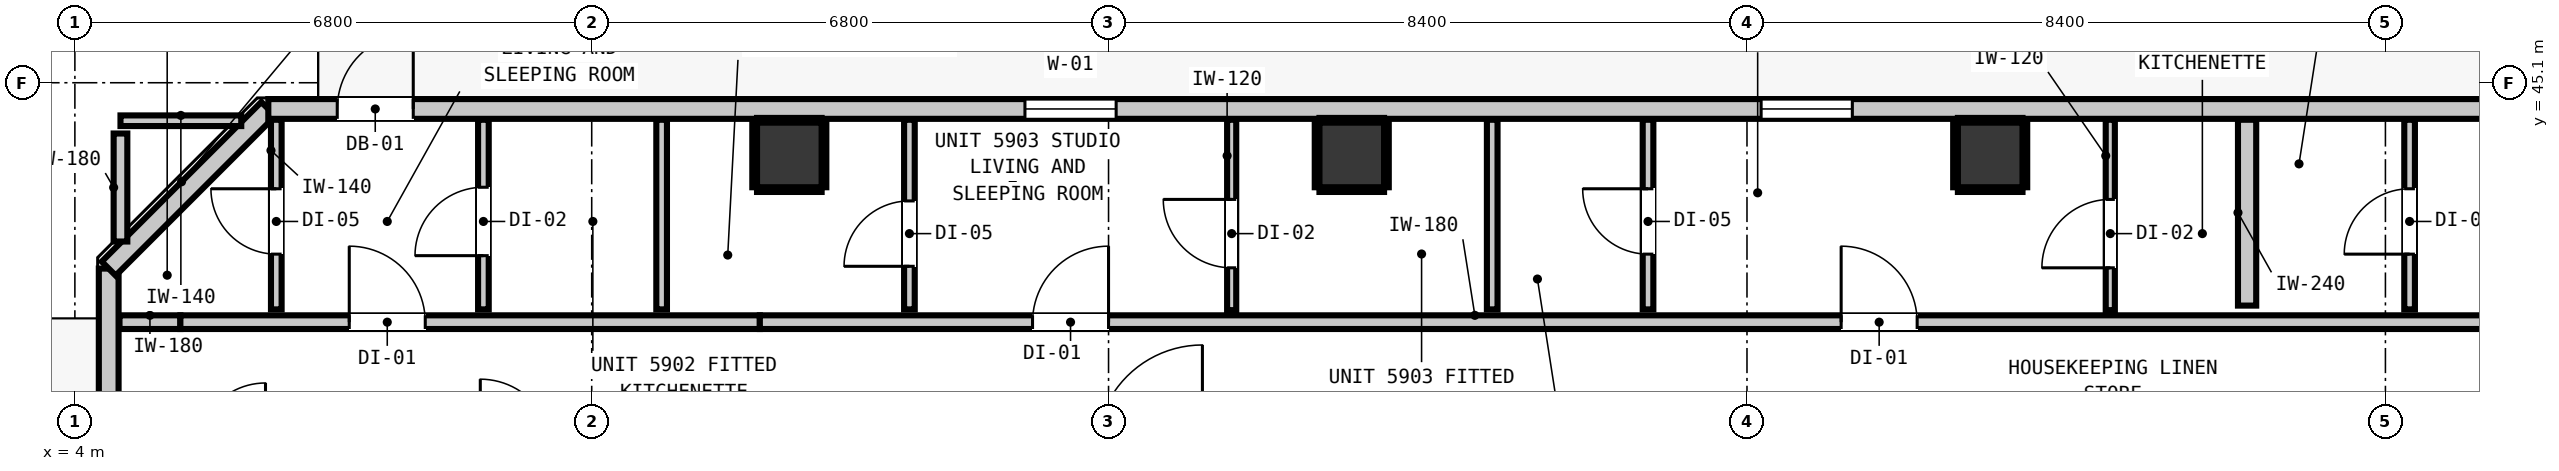
"""IFC4 building model, lengths in metres.
Left out: names, types, materials, properties, quantities, classifications, styles, units other than length and angle.
Written with IfcOpenShell. Run it as: python <this file> out.ifc"""

import sys

from ifc_helpers import new_model, si_unit, direction, frame, frame_2d, origin, origin_2d, place, context, subcontext, project, spatial, rectangle, extrude, element, fill, save


model = new_model("IFC4")
c1 = context("Model", 3, precision=1e-05, world=origin(), true_north=direction((0.0, 1.0)))
c2 = subcontext(c1, "Body", "Model", "MODEL_VIEW")
j1 = project(units=[si_unit("LENGTHUNIT", "METRE"), si_unit("PLANEANGLEUNIT", "RADIAN")], contexts=[c1])
p1 = place(None, origin())
s1 = spatial("IfcSite", under=j1, at=p1, CompositionType="ELEMENT")
p2 = place(p1, origin())
s2 = spatial("IfcBuilding", under=s1, at=p2, CompositionType="ELEMENT")
p3 = place(p2, frame((0.0, 0.0, 203.44)))
s3 = spatial("IfcBuildingStorey", under=s2, at=p3, CompositionType="ELEMENT", Elevation=203.44)
for number, where, z_axis, x_axis in (
    (1, (13.4, 44.15, 0.0), (0.0, 0.0, 1.0), (1.0, 0.0, 0.0)),
    (2, (20.8, 44.15, 0.0), (0.0, 0.0, 1.0), (1.0, 0.0, 0.0)),
    (3, (29.2, 44.15, 0.0), (0.0, 0.0, 1.0), (1.0, 0.0, 0.0)),
):
    element("IfcColumn", number, at=place(p3, frame(where, z_axis=z_axis, x_axis=x_axis)), inside=s3, PredefinedType="COLUMN", context=c2, shape_type="SweptSolid", body=[
        extrude(rectangle(XDim=0.85, YDim=0.85, at=origin_2d()), origin(), (0.0, 0.0, 1.0), 3.32),
    ])
p4 = place(p3, frame((4.445, 12.345, 0.0), z_axis=(0.0, 0.0, 1.0), x_axis=(0.0, 1.0, 0.0)))
e4 = element("IfcWall", 4, at=p4, inside=s3, PredefinedType="STANDARD", context=c2, shape_type="SweptSolid", body=[
    extrude(rectangle(XDim=30.31, YDim=0.26, at=frame_2d((15.155, 0.0))), origin(), (0.0, 0.0, 1.0), 3.1),
])
p5 = place(p4, frame((0.91, 0.0, 0.0)))
e5 = element("IfcOpeningElement", 5, at=p5, cuts=e4, PredefinedType="OPENING", context=c2, shape_type="SweptSolid", body=[
    extrude(rectangle(XDim=1.0, YDim=2.15, at=frame_2d((0.5, 1.075))), frame((0.0, 0.14, 0.0), z_axis=(0.0, -1.0, 0.0), x_axis=(1.0, 0.0, 0.0)), (0.0, 0.0, 1.0), 0.28),
])
p6 = place(p4, frame((2.322, 0.0, 0.85)))
e6 = element("IfcOpeningElement", 6, at=p6, cuts=e4, PredefinedType="OPENING", context=c2, shape_type="SweptSolid", body=[
    extrude(rectangle(XDim=0.58, YDim=1.5, at=frame_2d((0.29, 0.75))), frame((0.0, 0.14, 0.0), z_axis=(0.0, -1.0, 0.0), x_axis=(1.0, 0.0, 0.0)), (0.0, 0.0, 1.0), 0.28),
])
p7 = place(p4, frame((13.405, 0.0, 0.85)))
e7 = element("IfcOpeningElement", 7, at=p7, cuts=e4, PredefinedType="OPENING", context=c2, shape_type="SweptSolid", body=[
    extrude(rectangle(XDim=1.2, YDim=1.8, at=frame_2d((0.6, 0.9))), frame((0.0, 0.14, 0.0), z_axis=(0.0, -1.0, 0.0), x_axis=(1.0, 0.0, 0.0)), (0.0, 0.0, 1.0), 0.28),
])
p8 = place(p3, frame((4.445, 42.655, 0.0), z_axis=(0.0, 0.0, 1.0), x_axis=(0.707106781187, 0.707106781187, 0.0)))
e8 = element("IfcWall", 8, at=p8, inside=s3, PredefinedType="STANDARD", context=c2, shape_type="SweptSolid", body=[
    extrude(rectangle(XDim=2.97, YDim=0.26, at=frame_2d((1.485, 0.0))), origin(), (0.0, 0.0, 1.0), 3.1),
])
p9 = place(p3, frame((6.545, 44.755, 0.0), z_axis=(0.0, 0.0, 1.0), x_axis=(1.0, 0.0, 0.0)))
e9 = element("IfcWall", 9, at=p9, inside=s3, PredefinedType="STANDARD", context=c2, shape_type="SweptSolid", body=[
    extrude(rectangle(XDim=32.71, YDim=0.26, at=frame_2d((16.355, 0.0))), origin(), (0.0, 0.0, 1.0), 3.1),
])
p10 = place(p9, frame((0.907, 0.0, 0.0)))
e10 = element("IfcOpeningElement", 10, at=p10, cuts=e9, PredefinedType="OPENING", context=c2, shape_type="SweptSolid", body=[
    extrude(rectangle(XDim=1.0, YDim=2.15, at=frame_2d((0.5, 1.075))), frame((0.0, 0.14, 0.0), z_axis=(0.0, -1.0, 0.0), x_axis=(1.0, 0.0, 0.0)), (0.0, 0.0, 1.0), 0.28),
])
p11 = place(p9, frame((9.955, 0.0, 0.85)))
e11 = element("IfcOpeningElement", 11, at=p11, cuts=e9, PredefinedType="OPENING", context=c2, shape_type="SweptSolid", body=[
    extrude(rectangle(XDim=1.2, YDim=1.8, at=frame_2d((0.6, 0.9))), frame((0.0, 0.14, 0.0), z_axis=(0.0, -1.0, 0.0), x_axis=(1.0, 0.0, 0.0)), (0.0, 0.0, 1.0), 0.28),
])
p12 = place(p9, frame((19.641, 0.0, 0.85)))
e12 = element("IfcOpeningElement", 12, at=p12, cuts=e9, PredefinedType="OPENING", context=c2, shape_type="SweptSolid", body=[
    extrude(rectangle(XDim=1.2, YDim=1.8, at=frame_2d((0.6, 0.9))), frame((0.0, 0.14, 0.0), z_axis=(0.0, -1.0, 0.0), x_axis=(1.0, 0.0, 0.0)), (0.0, 0.0, 1.0), 0.28),
])
p13 = place(p9, frame((30.792, 0.0, 0.85)))
e13 = element("IfcOpeningElement", 13, at=p13, cuts=e9, PredefinedType="OPENING", context=c2, shape_type="SweptSolid", body=[
    extrude(rectangle(XDim=1.2, YDim=1.8, at=frame_2d((0.6, 0.9))), frame((0.0, 0.14, 0.0), z_axis=(0.0, -1.0, 0.0), x_axis=(1.0, 0.0, 0.0)), (0.0, 0.0, 1.0), 0.28),
])
p14 = place(p3, frame((4.587, 41.95, 0.0), z_axis=(0.0, 0.0, 1.0), x_axis=(1.0, 0.0, 0.0)))
e14 = element("IfcWall", 14, at=p14, inside=s3, PredefinedType="PARTITIONING", context=c2, shape_type="SweptSolid", body=[
    extrude(rectangle(XDim=0.801, YDim=0.18, at=frame_2d((0.4, 0.0))), origin(), (0.0, 0.0, 1.0), 3.1),
])
p15 = place(p3, frame((5.388, 41.95, 0.0), z_axis=(0.0, 0.0, 1.0), x_axis=(1.0, 0.0, 0.0)))
e15 = element("IfcWall", 15, at=p15, inside=s3, PredefinedType="PARTITIONING", context=c2, shape_type="SweptSolid", body=[
    extrude(rectangle(XDim=7.624, YDim=0.18, at=frame_2d((3.812, 0.0))), origin(), (0.0, 0.0, 1.0), 2.477),
])
p16 = place(p15, frame((2.222, 0.0, 0.0)))
e16 = element("IfcOpeningElement", 16, at=p16, cuts=e15, PredefinedType="OPENING", context=c2, shape_type="SweptSolid", body=[
    extrude(rectangle(XDim=1.0, YDim=2.15, at=frame_2d((0.5, 1.075))), frame((0.0, 0.1, 0.0), z_axis=(0.0, -1.0, 0.0), x_axis=(1.0, 0.0, 0.0)), (0.0, 0.0, 1.0), 0.2),
])
p17 = place(p3, frame((13.012, 41.95, 0.0), z_axis=(0.0, 0.0, 1.0), x_axis=(1.0, 0.0, 0.0)))
e17 = element("IfcWall", 17, at=p17, inside=s3, PredefinedType="PARTITIONING", context=c2, shape_type="SweptSolid", body=[
    extrude(rectangle(XDim=28.201, YDim=0.18, at=frame_2d((14.101, 0.0))), origin(), (0.0, 0.0, 1.0), 3.1),
])
p18 = place(p17, frame((3.588, 0.0, 0.0)))
e18 = element("IfcOpeningElement", 18, at=p18, cuts=e17, PredefinedType="OPENING", context=c2, shape_type="SweptSolid", body=[
    extrude(rectangle(XDim=1.0, YDim=2.15, at=frame_2d((0.5, 1.075))), frame((0.0, 0.1, 0.0), z_axis=(0.0, -1.0, 0.0), x_axis=(1.0, 0.0, 0.0)), (0.0, 0.0, 1.0), 0.2),
])
p19 = place(p17, frame((14.227, 0.0, 0.0)))
e19 = element("IfcOpeningElement", 19, at=p19, cuts=e17, PredefinedType="OPENING", context=c2, shape_type="SweptSolid", body=[
    extrude(rectangle(XDim=1.0, YDim=2.15, at=frame_2d((0.5, 1.075))), frame((0.0, 0.1, 0.0), z_axis=(0.0, -1.0, 0.0), x_axis=(1.0, 0.0, 0.0)), (0.0, 0.0, 1.0), 0.2),
])
p20 = place(p17, frame((23.372, 0.0, 0.0)))
e20 = element("IfcOpeningElement", 20, at=p20, cuts=e17, PredefinedType="OPENING", context=c2, shape_type="SweptSolid", body=[
    extrude(rectangle(XDim=1.0, YDim=2.15, at=frame_2d((0.5, 1.075))), frame((0.0, 0.1, 0.0), z_axis=(0.0, -1.0, 0.0), x_axis=(1.0, 0.0, 0.0)), (0.0, 0.0, 1.0), 0.2),
])
p21 = place(p3, frame((4.6, 44.6, 0.0), z_axis=(0.0, 0.0, 1.0), x_axis=(1.0, 0.0, 0.0)))
e21 = element("IfcWall", 21, at=p21, inside=s3, PredefinedType="PARTITIONING", context=c2, shape_type="SweptSolid", body=[
    extrude(rectangle(XDim=1.589, YDim=0.14, at=frame_2d((0.794, 0.0))), origin(), (0.0, 0.0, 1.0), 3.1),
])
p22 = place(p3, frame((32.58, 42.168, 0.0), z_axis=(0.0, 0.0, 1.0), x_axis=(0.0, 1.0, 0.0)))
e22 = element("IfcWall", 22, at=p22, inside=s3, PredefinedType="PARTITIONING", context=c2, shape_type="SweptSolid", body=[
    extrude(rectangle(XDim=2.445, YDim=0.24, at=frame_2d((1.223, 0.0))), origin(), (0.0, 0.0, 1.0), 3.1),
])
p23 = place(p3, frame((4.6, 43.011, 0.0), z_axis=(0.0, 0.0, 1.0), x_axis=(0.0, 1.0, 0.0)))
e23 = element("IfcWall", 23, at=p23, inside=s3, PredefinedType="PARTITIONING", context=c2, shape_type="SweptSolid", body=[
    extrude(rectangle(XDim=1.421, YDim=0.18, at=frame_2d((0.71, 0.0))), origin(), (0.0, 0.0, 1.0), 3.1),
])
p24 = place(p3, frame((6.65, 42.118, 0.0), z_axis=(0.0, 0.0, 1.0), x_axis=(0.0, 1.0, 0.0)))
e24 = element("IfcWall", 24, at=p24, inside=s3, PredefinedType="PARTITIONING", context=c2, shape_type="SweptSolid", body=[
    extrude(rectangle(XDim=2.495, YDim=0.14, at=frame_2d((1.248, 0.0))), origin(), (0.0, 0.0, 1.0), 3.1),
])
p25 = place(p24, frame((0.727, 0.0, 0.0)))
e25 = element("IfcOpeningElement", 25, at=p25, cuts=e24, PredefinedType="OPENING", context=c2, shape_type="SweptSolid", body=[
    extrude(rectangle(XDim=0.86, YDim=2.02, at=frame_2d((0.43, 1.01))), frame((0.0, 0.08, 0.0), z_axis=(0.0, -1.0, 0.0), x_axis=(1.0, 0.0, 0.0)), (0.0, 0.0, 1.0), 0.16),
])
p26 = place(p3, frame((9.375, 42.118, 0.0), z_axis=(0.0, 0.0, 1.0), x_axis=(0.0, 1.0, 0.0)))
e26 = element("IfcWall", 26, at=p26, inside=s3, PredefinedType="PARTITIONING", context=c2, shape_type="SweptSolid", body=[
    extrude(rectangle(XDim=2.495, YDim=0.14, at=frame_2d((1.248, 0.0))), origin(), (0.0, 0.0, 1.0), 3.1),
])
p27 = place(p26, frame((0.707, 0.0, 0.0)))
e27 = element("IfcOpeningElement", 27, at=p27, cuts=e26, PredefinedType="OPENING", context=c2, shape_type="SweptSolid", body=[
    extrude(rectangle(XDim=0.9, YDim=2.1, at=frame_2d((0.45, 1.05))), frame((0.0, 0.08, 0.0), z_axis=(0.0, -1.0, 0.0), x_axis=(1.0, 0.0, 0.0)), (0.0, 0.0, 1.0), 0.16),
])
p28 = place(p3, frame((11.72, 42.118, 0.0), z_axis=(0.0, 0.0, 1.0), x_axis=(0.0, 1.0, 0.0)))
e28 = element("IfcWall", 28, at=p28, inside=s3, PredefinedType="PARTITIONING", context=c2, shape_type="SweptSolid", body=[
    extrude(rectangle(XDim=2.495, YDim=0.14, at=frame_2d((1.248, 0.0))), origin(), (0.0, 0.0, 1.0), 3.1),
])
p29 = place(p3, frame((14.98, 42.118, 0.0), z_axis=(0.0, 0.0, 1.0), x_axis=(0.0, 1.0, 0.0)))
e29 = element("IfcWall", 29, at=p29, inside=s3, PredefinedType="PARTITIONING", context=c2, shape_type="SweptSolid", body=[
    extrude(rectangle(XDim=2.495, YDim=0.14, at=frame_2d((1.248, 0.0))), origin(), (0.0, 0.0, 1.0), 3.1),
])
p30 = place(p29, frame((0.567, 0.0, 0.0)))
e30 = element("IfcOpeningElement", 30, at=p30, cuts=e29, PredefinedType="OPENING", context=c2, shape_type="SweptSolid", body=[
    extrude(rectangle(XDim=0.86, YDim=2.02, at=frame_2d((0.43, 1.01))), frame((0.0, 0.08, 0.0), z_axis=(0.0, -1.0, 0.0), x_axis=(1.0, 0.0, 0.0)), (0.0, 0.0, 1.0), 0.16),
])
p31 = place(p3, frame((22.648, 42.118, 0.0), z_axis=(0.0, 0.0, 1.0), x_axis=(0.0, 1.0, 0.0)))
e31 = element("IfcWall", 31, at=p31, inside=s3, PredefinedType="PARTITIONING", context=c2, shape_type="SweptSolid", body=[
    extrude(rectangle(XDim=2.495, YDim=0.14, at=frame_2d((1.248, 0.0))), origin(), (0.0, 0.0, 1.0), 3.1),
])
p32 = place(p3, frame((24.698, 42.118, 0.0), z_axis=(0.0, 0.0, 1.0), x_axis=(0.0, 1.0, 0.0)))
e32 = element("IfcWall", 32, at=p32, inside=s3, PredefinedType="PARTITIONING", context=c2, shape_type="SweptSolid", body=[
    extrude(rectangle(XDim=2.495, YDim=0.14, at=frame_2d((1.248, 0.0))), origin(), (0.0, 0.0, 1.0), 3.1),
])
p33 = place(p32, frame((0.727, 0.0, 0.0)))
e33 = element("IfcOpeningElement", 33, at=p33, cuts=e32, PredefinedType="OPENING", context=c2, shape_type="SweptSolid", body=[
    extrude(rectangle(XDim=0.86, YDim=2.02, at=frame_2d((0.43, 1.01))), frame((0.0, 0.08, 0.0), z_axis=(0.0, -1.0, 0.0), x_axis=(1.0, 0.0, 0.0)), (0.0, 0.0, 1.0), 0.16),
])
p34 = place(p3, frame((34.718, 42.118, 0.0), z_axis=(0.0, 0.0, 1.0), x_axis=(0.0, 1.0, 0.0)))
e34 = element("IfcWall", 34, at=p34, inside=s3, PredefinedType="PARTITIONING", context=c2, shape_type="SweptSolid", body=[
    extrude(rectangle(XDim=2.495, YDim=0.14, at=frame_2d((1.248, 0.0))), origin(), (0.0, 0.0, 1.0), 3.1),
])
p35 = place(p34, frame((0.727, 0.0, 0.0)))
e35 = element("IfcOpeningElement", 35, at=p35, cuts=e34, PredefinedType="OPENING", context=c2, shape_type="SweptSolid", body=[
    extrude(rectangle(XDim=0.86, YDim=2.02, at=frame_2d((0.43, 1.01))), frame((0.0, 0.08, 0.0), z_axis=(0.0, -1.0, 0.0), x_axis=(1.0, 0.0, 0.0)), (0.0, 0.0, 1.0), 0.16),
])
p36 = place(p3, frame((19.22, 42.108, 0.0), z_axis=(0.0, 0.0, 1.0), x_axis=(0.0, 1.0, 0.0)))
e36 = element("IfcWall", 36, at=p36, inside=s3, PredefinedType="PARTITIONING", context=c2, shape_type="SweptSolid", body=[
    extrude(rectangle(XDim=2.505, YDim=0.12, at=frame_2d((1.252, 0.0))), origin(), (0.0, 0.0, 1.0), 3.1),
])
p37 = place(p36, frame((0.557, 0.0, 0.0)))
e37 = element("IfcOpeningElement", 37, at=p37, cuts=e36, PredefinedType="OPENING", context=c2, shape_type="SweptSolid", body=[
    extrude(rectangle(XDim=0.9, YDim=2.1, at=frame_2d((0.45, 1.05))), frame((0.0, 0.07, 0.0), z_axis=(0.0, -1.0, 0.0), x_axis=(1.0, 0.0, 0.0)), (0.0, 0.0, 1.0), 0.14),
])
p38 = place(p3, frame((30.78, 42.108, 0.0), z_axis=(0.0, 0.0, 1.0), x_axis=(0.0, 1.0, 0.0)))
e38 = element("IfcWall", 38, at=p38, inside=s3, PredefinedType="PARTITIONING", context=c2, shape_type="SweptSolid", body=[
    extrude(rectangle(XDim=2.505, YDim=0.12, at=frame_2d((1.252, 0.0))), origin(), (0.0, 0.0, 1.0), 3.1),
])
p39 = place(p38, frame((0.557, 0.0, 0.0)))
e39 = element("IfcOpeningElement", 39, at=p39, cuts=e38, PredefinedType="OPENING", context=c2, shape_type="SweptSolid", body=[
    extrude(rectangle(XDim=0.9, YDim=2.1, at=frame_2d((0.45, 1.05))), frame((0.0, 0.07, 0.0), z_axis=(0.0, -1.0, 0.0), x_axis=(1.0, 0.0, 0.0)), (0.0, 0.0, 1.0), 0.14),
])
for number, where, z_axis, x_axis in (
    (40, (12.975, 43.693, 0.0), (0.0, 0.0, 1.0), (1.0, 0.0, 0.0)),
    (41, (12.975, 44.607, 0.0), (0.0, 0.0, 1.0), (1.0, 0.0, 0.0)),
    (42, (12.943, 43.725, 0.0), (0.0, 0.0, 1.0), (0.0, 1.0, 0.0)),
    (43, (13.857, 43.725, 0.0), (0.0, 0.0, 1.0), (0.0, 1.0, 0.0)),
):
    element("IfcWall", number, at=place(p3, frame(where, z_axis=z_axis, x_axis=x_axis)), inside=s3, PredefinedType="PARTITIONING", context=c2, shape_type="SweptSolid", body=[
        extrude(rectangle(XDim=0.85, YDim=0.06, at=frame_2d((0.425, 0.0))), origin(), (0.0, 0.0, 1.0), 1.45),
    ])
for number, where, z_axis, x_axis in (
    (44, (20.375, 43.693, 0.0), (0.0, 0.0, 1.0), (1.0, 0.0, 0.0)),
    (45, (20.375, 44.607, 0.0), (0.0, 0.0, 1.0), (1.0, 0.0, 0.0)),
):
    element("IfcWall", number, at=place(p3, frame(where, z_axis=z_axis, x_axis=x_axis)), inside=s3, PredefinedType="PARTITIONING", context=c2, shape_type="SweptSolid", body=[
        extrude(rectangle(XDim=0.85, YDim=0.06, at=frame_2d((0.425, 0.0))), origin(), (0.0, 0.0, 1.0), 1.45),
    ])
for number, where, z_axis, x_axis in (
    (46, (20.343, 43.725, 0.0), (0.0, 0.0, 1.0), (0.0, 1.0, 0.0)),
    (47, (21.257, 43.725, 0.0), (0.0, 0.0, 1.0), (0.0, 1.0, 0.0)),
):
    element("IfcWall", number, at=place(p3, frame(where, z_axis=z_axis, x_axis=x_axis)), inside=s3, PredefinedType="PARTITIONING", context=c2, shape_type="SweptSolid", body=[
        extrude(rectangle(XDim=0.85, YDim=0.06, at=frame_2d((0.425, 0.0))), origin(), (0.0, 0.0, 1.0), 1.45),
    ])
for number, where, z_axis, x_axis in (
    (48, (28.775, 43.693, 0.0), (0.0, 0.0, 1.0), (1.0, 0.0, 0.0)),
    (49, (28.775, 44.607, 0.0), (0.0, 0.0, 1.0), (1.0, 0.0, 0.0)),
):
    element("IfcWall", number, at=place(p3, frame(where, z_axis=z_axis, x_axis=x_axis)), inside=s3, PredefinedType="PARTITIONING", context=c2, shape_type="SweptSolid", body=[
        extrude(rectangle(XDim=0.85, YDim=0.06, at=frame_2d((0.425, 0.0))), origin(), (0.0, 0.0, 1.0), 1.45),
    ])
for number, where, z_axis, x_axis in (
    (50, (28.743, 43.725, 0.0), (0.0, 0.0, 1.0), (0.0, 1.0, 0.0)),
    (51, (29.657, 43.725, 0.0), (0.0, 0.0, 1.0), (0.0, 1.0, 0.0)),
):
    element("IfcWall", number, at=place(p3, frame(where, z_axis=z_axis, x_axis=x_axis)), inside=s3, PredefinedType="PARTITIONING", context=c2, shape_type="SweptSolid", body=[
        extrude(rectangle(XDim=0.85, YDim=0.06, at=frame_2d((0.425, 0.0))), origin(), (0.0, 0.0, 1.0), 1.45),
    ])
p40 = place(p10, origin())
e52 = element("IfcDoor", 52, at=p40, inside=s3, OperationType="SINGLE_SWING_RIGHT", PredefinedType="DOOR", context=c2, shape_type="SweptSolid", body=[
    extrude(rectangle(XDim=1.0, YDim=2.15, at=frame_2d((0.5, 1.075))), frame((0.0, 0.025, 0.0), z_axis=(0.0, -1.0, 0.0), x_axis=(1.0, 0.0, 0.0)), (0.0, 0.0, 1.0), 0.05),
])
fill(e10, e52)
p41 = place(p11, origin())
e53 = element("IfcWindow", 53, at=p41, inside=s3, PartitioningType="SINGLE_PANEL", PredefinedType="WINDOW", context=c2, shape_type="SweptSolid", body=[
    extrude(rectangle(XDim=1.2, YDim=1.8, at=frame_2d((0.6, 0.9))), frame((0.0, 0.03, 0.0), z_axis=(0.0, -1.0, 0.0), x_axis=(1.0, 0.0, 0.0)), (0.0, 0.0, 1.0), 0.06),
])
fill(e11, e53)
p42 = place(p12, origin())
e54 = element("IfcWindow", 54, at=p42, inside=s3, PartitioningType="SINGLE_PANEL", PredefinedType="WINDOW", context=c2, shape_type="SweptSolid", body=[
    extrude(rectangle(XDim=1.2, YDim=1.8, at=frame_2d((0.6, 0.9))), frame((0.0, 0.03, 0.0), z_axis=(0.0, -1.0, 0.0), x_axis=(1.0, 0.0, 0.0)), (0.0, 0.0, 1.0), 0.06),
])
fill(e12, e54)
p43 = place(p16, origin())
e55 = element("IfcDoor", 55, at=p43, inside=s3, OperationType="SINGLE_SWING_LEFT", PredefinedType="DOOR", context=c2, shape_type="SweptSolid", body=[
    extrude(rectangle(XDim=1.0, YDim=2.15, at=frame_2d((0.5, 1.075))), frame((0.0, 0.025, 0.0), z_axis=(0.0, -1.0, 0.0), x_axis=(1.0, 0.0, 0.0)), (0.0, 0.0, 1.0), 0.05),
])
fill(e16, e55)
p44 = place(p25, origin())
e56 = element("IfcDoor", 56, at=p44, inside=s3, OperationType="SINGLE_SWING_RIGHT", PredefinedType="DOOR", context=c2, shape_type="SweptSolid", body=[
    extrude(rectangle(XDim=0.86, YDim=2.02, at=frame_2d((0.43, 1.01))), frame((0.0, 0.025, 0.0), z_axis=(0.0, -1.0, 0.0), x_axis=(1.0, 0.0, 0.0)), (0.0, 0.0, 1.0), 0.05),
])
fill(e25, e56)
p45 = place(p27, origin())
e57 = element("IfcDoor", 57, at=p45, inside=s3, OperationType="SINGLE_SWING_LEFT", PredefinedType="DOOR", context=c2, shape_type="SweptSolid", body=[
    extrude(rectangle(XDim=0.9, YDim=2.1, at=frame_2d((0.45, 1.05))), frame((0.0, 0.025, 0.0), z_axis=(0.0, -1.0, 0.0), x_axis=(1.0, 0.0, 0.0)), (0.0, 0.0, 1.0), 0.05),
])
fill(e27, e57)
p46 = place(p18, origin())
e58 = element("IfcDoor", 58, at=p46, inside=s3, OperationType="SINGLE_SWING_RIGHT", PredefinedType="DOOR", context=c2, shape_type="SweptSolid", body=[
    extrude(rectangle(XDim=1.0, YDim=2.15, at=frame_2d((0.5, 1.075))), frame((0.0, 0.025, 0.0), z_axis=(0.0, -1.0, 0.0), x_axis=(1.0, 0.0, 0.0)), (0.0, 0.0, 1.0), 0.05),
])
fill(e18, e58)
p47 = place(p30, origin())
e59 = element("IfcDoor", 59, at=p47, inside=s3, OperationType="SINGLE_SWING_LEFT", PredefinedType="DOOR", context=c2, shape_type="SweptSolid", body=[
    extrude(rectangle(XDim=0.86, YDim=2.02, at=frame_2d((0.43, 1.01))), frame((0.0, 0.025, 0.0), z_axis=(0.0, -1.0, 0.0), x_axis=(1.0, 0.0, 0.0)), (0.0, 0.0, 1.0), 0.05),
])
fill(e30, e59)
p48 = place(p37, origin())
e60 = element("IfcDoor", 60, at=p48, inside=s3, OperationType="SINGLE_SWING_RIGHT", PredefinedType="DOOR", context=c2, shape_type="SweptSolid", body=[
    extrude(rectangle(XDim=0.9, YDim=2.1, at=frame_2d((0.45, 1.05))), frame((0.0, 0.025, 0.0), z_axis=(0.0, -1.0, 0.0), x_axis=(1.0, 0.0, 0.0)), (0.0, 0.0, 1.0), 0.05),
])
fill(e37, e60)
p49 = place(p19, origin())
e61 = element("IfcDoor", 61, at=p49, inside=s3, OperationType="SINGLE_SWING_LEFT", PredefinedType="DOOR", context=c2, shape_type="SweptSolid", body=[
    extrude(rectangle(XDim=1.0, YDim=2.15, at=frame_2d((0.5, 1.075))), frame((0.0, 0.025, 0.0), z_axis=(0.0, -1.0, 0.0), x_axis=(1.0, 0.0, 0.0)), (0.0, 0.0, 1.0), 0.05),
])
fill(e19, e61)
p50 = place(p33, origin())
e62 = element("IfcDoor", 62, at=p50, inside=s3, OperationType="SINGLE_SWING_RIGHT", PredefinedType="DOOR", context=c2, shape_type="SweptSolid", body=[
    extrude(rectangle(XDim=0.86, YDim=2.02, at=frame_2d((0.43, 1.01))), frame((0.0, 0.025, 0.0), z_axis=(0.0, -1.0, 0.0), x_axis=(1.0, 0.0, 0.0)), (0.0, 0.0, 1.0), 0.05),
])
fill(e33, e62)
p51 = place(p39, origin())
e63 = element("IfcDoor", 63, at=p51, inside=s3, OperationType="SINGLE_SWING_LEFT", PredefinedType="DOOR", context=c2, shape_type="SweptSolid", body=[
    extrude(rectangle(XDim=0.9, YDim=2.1, at=frame_2d((0.45, 1.05))), frame((0.0, 0.025, 0.0), z_axis=(0.0, -1.0, 0.0), x_axis=(1.0, 0.0, 0.0)), (0.0, 0.0, 1.0), 0.05),
])
fill(e39, e63)
p52 = place(p35, origin())
e64 = element("IfcDoor", 64, at=p52, inside=s3, OperationType="SINGLE_SWING_LEFT", PredefinedType="DOOR", context=c2, shape_type="SweptSolid", body=[
    extrude(rectangle(XDim=0.86, YDim=2.02, at=frame_2d((0.43, 1.01))), frame((0.0, 0.025, 0.0), z_axis=(0.0, -1.0, 0.0), x_axis=(1.0, 0.0, 0.0)), (0.0, 0.0, 1.0), 0.05),
])
fill(e35, e64)
save(model, sys.argv[1])
